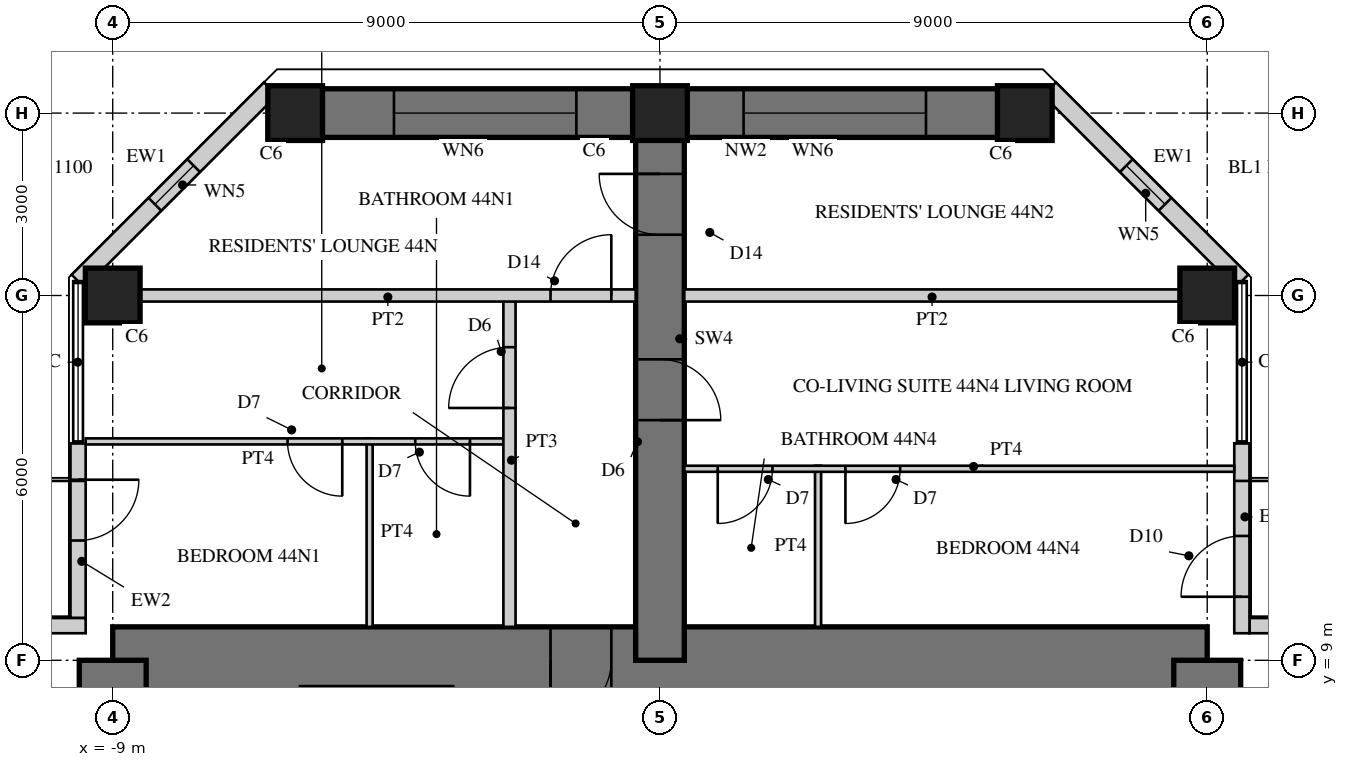
"""IFC4 building model, lengths in metres.
Left out: names, types, materials, properties, quantities, classifications, styles, units other than length and angle.
Written with IfcOpenShell. Run it as: python <this file> out.ifc"""

import sys

from ifc_helpers import new_model, si_unit, direction, frame, frame_2d, origin, origin_2d, place, context, subcontext, project, spatial, rectangle, hollow_rectangle, extrude, element, fill, save


model = new_model("IFC4")
c1 = context("Model", 3, precision=1e-05, world=origin(), true_north=direction((0.0, 1.0)))
c2 = subcontext(c1, "Body", "Model", "MODEL_VIEW")
j1 = project(units=[si_unit("LENGTHUNIT", "METRE"), si_unit("PLANEANGLEUNIT", "RADIAN")], contexts=[c1])
p1 = place(None, origin())
s1 = spatial("IfcSite", under=j1, at=p1, CompositionType="ELEMENT")
p2 = place(p1, origin())
s2 = spatial("IfcBuilding", under=s1, at=p2, CompositionType="ELEMENT")
p3 = place(p2, frame((0.0, 0.0, 179.7)))
s3 = spatial("IfcBuildingStorey", under=s2, at=p3, CompositionType="ELEMENT", Elevation=179.7)
p4 = place(p3, frame((9.0, 9.0, 0.0), z_axis=(0.0, 0.0, 1.0), x_axis=(-1.0, 0.0, 0.0)))
e1 = element("IfcWall", 1, at=p4, inside=s3, PredefinedType="SHEAR", context=c2, shape_type="SweptSolid", body=[
    extrude(rectangle(XDim=18.0, YDim=1.1, at=frame_2d((9.0, 0.0))), origin(), (0.0, 0.0, 1.0), 3.4),
])
p5 = place(p4, frame((9.8, 0.0, 0.0)))
e2 = element("IfcOpeningElement", 2, at=p5, cuts=e1, PredefinedType="OPENING", context=c2, shape_type="SweptSolid", body=[
    extrude(rectangle(XDim=1.0, YDim=2.4, at=frame_2d((0.5, 1.2))), frame((0.0, 0.56, 0.0), z_axis=(0.0, -1.0, 0.0), x_axis=(1.0, 0.0, 0.0)), (0.0, 0.0, 1.0), 1.12),
])
p6 = place(p3, frame((9.0, -9.0, 0.0), z_axis=(0.0, 0.0, 1.0), x_axis=(0.0, 1.0, 0.0)))
e3 = element("IfcWall", 3, at=p6, inside=s3, PredefinedType="SHEAR", context=c2, shape_type="SweptSolid", body=[
    extrude(rectangle(XDim=18.0, YDim=1.1, at=frame_2d((9.0, 0.0))), origin(), (0.0, 0.0, 1.0), 3.4),
])
p7 = place(p6, frame((9.8, 0.0, 0.0)))
e4 = element("IfcOpeningElement", 4, at=p7, cuts=e3, PredefinedType="OPENING", context=c2, shape_type="SweptSolid", body=[
    extrude(rectangle(XDim=1.0, YDim=2.4, at=frame_2d((0.5, 1.2))), frame((0.0, 0.56, 0.0), z_axis=(0.0, -1.0, 0.0), x_axis=(1.0, 0.0, 0.0)), (0.0, 0.0, 1.0), 1.12),
])
p8 = place(p3, frame((-9.0, 9.0, 0.0), z_axis=(0.0, 0.0, 1.0), x_axis=(0.0, -1.0, 0.0)))
e5 = element("IfcWall", 5, at=p8, inside=s3, PredefinedType="SHEAR", context=c2, shape_type="SweptSolid", body=[
    extrude(rectangle(XDim=18.0, YDim=1.1, at=frame_2d((9.0, 0.0))), origin(), (0.0, 0.0, 1.0), 3.4),
])
p9 = place(p8, frame((9.8, 0.0, 0.0)))
e6 = element("IfcOpeningElement", 6, at=p9, cuts=e5, PredefinedType="OPENING", context=c2, shape_type="SweptSolid", body=[
    extrude(rectangle(XDim=1.0, YDim=2.4, at=frame_2d((0.5, 1.2))), frame((0.0, 0.56, 0.0), z_axis=(0.0, -1.0, 0.0), x_axis=(1.0, 0.0, 0.0)), (0.0, 0.0, 1.0), 1.12),
])
p10 = place(p3, frame((0.0, 9.0, 0.0), z_axis=(0.0, 0.0, 1.0), x_axis=(0.0, 1.0, 0.0)))
e7 = element("IfcWall", 7, at=p10, inside=s3, PredefinedType="SHEAR", context=c2, shape_type="SweptSolid", body=[
    extrude(rectangle(XDim=9.0, YDim=0.8, at=frame_2d((4.5, 0.0))), origin(), (0.0, 0.0, 1.0), 3.4),
])
p11 = place(p10, frame((3.95, 0.0, 0.0)))
e8 = element("IfcOpeningElement", 8, at=p11, cuts=e7, PredefinedType="OPENING", context=c2, shape_type="SweptSolid", body=[
    extrude(rectangle(XDim=1.0, YDim=2.15, at=frame_2d((0.5, 1.075))), frame((0.0, 0.41, 0.0), z_axis=(0.0, -1.0, 0.0), x_axis=(1.0, 0.0, 0.0)), (0.0, 0.0, 1.0), 0.82),
])
p12 = place(p10, frame((7.0, 0.0, 0.0)))
e9 = element("IfcOpeningElement", 9, at=p12, cuts=e7, PredefinedType="OPENING", context=c2, shape_type="SweptSolid", body=[
    extrude(rectangle(XDim=1.0, YDim=2.2, at=frame_2d((0.5, 1.1))), frame((0.0, 0.41, 0.0), z_axis=(0.0, -1.0, 0.0), x_axis=(1.0, 0.0, 0.0)), (0.0, 0.0, 1.0), 0.82),
])
p13 = place(p3, frame((6.0, 18.0, 0.0), z_axis=(0.0, 0.0, 1.0), x_axis=(-1.0, 0.0, 0.0)))
e10 = element("IfcWall", 10, at=p13, inside=s3, PredefinedType="SHEAR", context=c2, shape_type="SweptSolid", body=[
    extrude(rectangle(XDim=12.0, YDim=0.8, at=frame_2d((6.0, 0.0))), origin(), (0.0, 0.0, 1.0), 3.4),
])
p14 = place(p13, frame((1.625, 0.0, 0.6)))
e11 = element("IfcOpeningElement", 11, at=p14, cuts=e10, PredefinedType="OPENING", context=c2, shape_type="SweptSolid", body=[
    extrude(rectangle(XDim=3.0, YDim=2.4, at=frame_2d((1.5, 1.2))), frame((0.0, 0.41, 0.0), z_axis=(0.0, -1.0, 0.0), x_axis=(1.0, 0.0, 0.0)), (0.0, 0.0, 1.0), 0.82),
])
p15 = place(p13, frame((7.375, 0.0, 0.6)))
e12 = element("IfcOpeningElement", 12, at=p15, cuts=e10, PredefinedType="OPENING", context=c2, shape_type="SweptSolid", body=[
    extrude(rectangle(XDim=3.0, YDim=2.4, at=frame_2d((1.5, 1.2))), frame((0.0, 0.41, 0.0), z_axis=(0.0, -1.0, 0.0), x_axis=(1.0, 0.0, 0.0)), (0.0, 0.0, 1.0), 0.82),
])
for number, where, z_axis, x_axis in (
    (13, (9.0, 15.0, 0.0), (0.0, 0.0, 1.0), (1.0, 0.0, 0.0)),
    (14, (-9.0, 15.0, 0.0), (0.0, 0.0, 1.0), (1.0, 0.0, 0.0)),
    (15, (6.0, 18.0, 0.0), (0.0, 0.0, 1.0), (1.0, 0.0, 0.0)),
    (16, (0.0, 18.0, 0.0), (0.0, 0.0, 1.0), (1.0, 0.0, 0.0)),
    (17, (-6.0, 18.0, 0.0), (0.0, 0.0, 1.0), (1.0, 0.0, 0.0)),
):
    element("IfcColumn", number, at=place(p3, frame(where, z_axis=z_axis, x_axis=x_axis)), inside=s3, PredefinedType="COLUMN", context=c2, shape_type="SweptSolid", body=[
        extrude(rectangle(XDim=0.9, YDim=0.9, at=origin_2d()), origin(), (0.0, 0.0, 1.0), 3.4),
    ])
p16 = place(p3, frame((12.57, 9.57, 0.0), z_axis=(0.0, 0.0, 1.0), x_axis=(-1.0, 0.0, 0.0)))
e18 = element("IfcWall", 18, at=p16, inside=s3, PredefinedType="SOLIDWALL", context=c2, shape_type="SweptSolid", body=[
    extrude(rectangle(XDim=2.875, YDim=0.25, at=frame_2d((1.438, 0.0))), origin(), (0.0, 0.0, 1.0), 3.22),
])
p17 = place(p16, frame((0.6, 0.0, 0.0)))
e19 = element("IfcOpeningElement", 19, at=p17, cuts=e18, PredefinedType="OPENING", context=c2, shape_type="SweptSolid", body=[
    extrude(rectangle(XDim=1.0, YDim=2.2, at=frame_2d((0.5, 1.1))), frame((0.0, 0.135, 0.0), z_axis=(0.0, -1.0, 0.0), x_axis=(1.0, 0.0, 0.0)), (0.0, 0.0, 1.0), 0.27),
])
p18 = place(p3, frame((9.57, 9.445, 0.0), z_axis=(0.0, 0.0, 1.0), x_axis=(0.0, 1.0, 0.0)))
e20 = element("IfcWall", 20, at=p18, inside=s3, PredefinedType="SOLIDWALL", context=c2, shape_type="SweptSolid", body=[
    extrude(rectangle(XDim=3.125, YDim=0.25, at=frame_2d((1.562, 0.0))), origin(), (0.0, 0.0, 1.0), 3.22),
])
p19 = place(p18, frame((0.6, 0.0, 0.0)))
e21 = element("IfcOpeningElement", 21, at=p19, cuts=e20, PredefinedType="OPENING", context=c2, shape_type="SweptSolid", body=[
    extrude(rectangle(XDim=1.0, YDim=2.2, at=frame_2d((0.5, 1.1))), frame((0.0, 0.135, 0.0), z_axis=(0.0, -1.0, 0.0), x_axis=(1.0, 0.0, 0.0)), (0.0, 0.0, 1.0), 0.27),
])
p20 = place(p3, frame((9.57, 15.236, 0.0), z_axis=(0.0, 0.0, 1.0), x_axis=(-0.707134062067, 0.707079499254, 0.0)))
e22 = element("IfcWall", 22, at=p20, inside=s3, PredefinedType="SOLIDWALL", context=c2, shape_type="SweptSolid", body=[
    extrude(rectangle(XDim=4.475, YDim=0.3, at=frame_2d((2.237, 0.0))), origin(), (0.0, 0.0, 1.0), 3.22),
])
p21 = place(p20, frame((1.787, 0.0, 0.3)))
e23 = element("IfcOpeningElement", 23, at=p21, cuts=e22, PredefinedType="OPENING", context=c2, shape_type="SweptSolid", body=[
    extrude(rectangle(XDim=0.9, YDim=2.4, at=frame_2d((0.45, 1.2))), frame((0.0, 0.16, 0.0), z_axis=(0.0, -1.0, 0.0), x_axis=(1.0, 0.0, 0.0)), (0.0, 0.0, 1.0), 0.32),
])
p22 = place(p3, frame((-6.406, 18.4, 0.0), z_axis=(0.0, 0.0, 1.0), x_axis=(-0.707134062067, -0.707079499254, 0.0)))
e24 = element("IfcWall", 24, at=p22, inside=s3, PredefinedType="SOLIDWALL", context=c2, shape_type="SweptSolid", body=[
    extrude(rectangle(XDim=4.475, YDim=0.3, at=frame_2d((2.237, 0.0))), origin(), (0.0, 0.0, 1.0), 3.22),
])
p23 = place(p22, frame((1.787, 0.0, 0.3)))
e25 = element("IfcOpeningElement", 25, at=p23, cuts=e24, PredefinedType="OPENING", context=c2, shape_type="SweptSolid", body=[
    extrude(rectangle(XDim=0.9, YDim=2.4, at=frame_2d((0.45, 1.2))), frame((0.0, 0.16, 0.0), z_axis=(0.0, -1.0, 0.0), x_axis=(1.0, 0.0, 0.0)), (0.0, 0.0, 1.0), 0.32),
])
p24 = place(p3, frame((-9.57, 12.57, 0.0), z_axis=(0.0, 0.0, 1.0), x_axis=(0.0, -1.0, 0.0)))
e26 = element("IfcWall", 26, at=p24, inside=s3, PredefinedType="SOLIDWALL", context=c2, shape_type="SweptSolid", body=[
    extrude(rectangle(XDim=2.875, YDim=0.25, at=frame_2d((1.438, 0.0))), origin(), (0.0, 0.0, 1.0), 3.22),
])
p25 = place(p24, frame((0.6, 0.0, 0.0)))
e27 = element("IfcOpeningElement", 27, at=p25, cuts=e26, PredefinedType="OPENING", context=c2, shape_type="SweptSolid", body=[
    extrude(rectangle(XDim=1.0, YDim=2.2, at=frame_2d((0.5, 1.1))), frame((0.0, 0.135, 0.0), z_axis=(0.0, -1.0, 0.0), x_axis=(1.0, 0.0, 0.0)), (0.0, 0.0, 1.0), 0.27),
])
p26 = place(p3, frame((-9.445, 9.57, 0.0), z_axis=(0.0, 0.0, 1.0), x_axis=(-1.0, 0.0, 0.0)))
e28 = element("IfcWall", 28, at=p26, inside=s3, PredefinedType="SOLIDWALL", context=c2, shape_type="SweptSolid", body=[
    extrude(rectangle(XDim=3.125, YDim=0.25, at=frame_2d((1.562, 0.0))), origin(), (0.0, 0.0, 1.0), 3.22),
])
p27 = place(p26, frame((0.6, 0.0, 0.0)))
e29 = element("IfcOpeningElement", 29, at=p27, cuts=e28, PredefinedType="OPENING", context=c2, shape_type="SweptSolid", body=[
    extrude(rectangle(XDim=1.0, YDim=2.2, at=frame_2d((0.5, 1.1))), frame((0.0, 0.135, 0.0), z_axis=(0.0, -1.0, 0.0), x_axis=(1.0, 0.0, 0.0)), (0.0, 0.0, 1.0), 0.27),
])
p28 = place(p3, frame((-4.775, 9.55, 0.0), z_axis=(0.0, 0.0, 1.0), x_axis=(0.0, 1.0, 0.0)))
e30 = element("IfcWall", 30, at=p28, inside=s3, PredefinedType="PARTITIONING", context=c2, shape_type="SweptSolid", body=[
    extrude(rectangle(XDim=3.1, YDim=0.1, at=frame_2d((1.55, 0.0))), origin(), (0.0, 0.0, 1.0), 3.22),
])
p29 = place(p3, frame((-2.575, 12.6, 0.0), z_axis=(0.0, 0.0, 1.0), x_axis=(-1.0, 0.0, 0.0)))
e31 = element("IfcWall", 31, at=p29, inside=s3, PredefinedType="PARTITIONING", context=c2, shape_type="SweptSolid", body=[
    extrude(rectangle(XDim=6.87, YDim=0.1, at=frame_2d((3.435, 0.0))), origin(), (0.0, 0.0, 1.0), 3.22),
])
p30 = place(p29, frame((0.55, 0.0, 0.0)))
e32 = element("IfcOpeningElement", 32, at=p30, cuts=e31, PredefinedType="OPENING", context=c2, shape_type="SweptSolid", body=[
    extrude(rectangle(XDim=0.9, YDim=2.1, at=frame_2d((0.45, 1.05))), frame((0.0, 0.06, 0.0), z_axis=(0.0, -1.0, 0.0), x_axis=(1.0, 0.0, 0.0)), (0.0, 0.0, 1.0), 0.12),
])
p31 = place(p29, frame((2.65, 0.0, 0.0)))
e33 = element("IfcOpeningElement", 33, at=p31, cuts=e31, PredefinedType="OPENING", context=c2, shape_type="SweptSolid", body=[
    extrude(rectangle(XDim=0.9, YDim=2.1, at=frame_2d((0.45, 1.05))), frame((0.0, 0.06, 0.0), z_axis=(0.0, -1.0, 0.0), x_axis=(1.0, 0.0, 0.0)), (0.0, 0.0, 1.0), 0.12),
])
p32 = place(p3, frame((2.6, 9.55, 0.0), z_axis=(0.0, 0.0, 1.0), x_axis=(0.0, 1.0, 0.0)))
e34 = element("IfcWall", 34, at=p32, inside=s3, PredefinedType="PARTITIONING", context=c2, shape_type="SweptSolid", body=[
    extrude(rectangle(XDim=2.65, YDim=0.1, at=frame_2d((1.325, 0.0))), origin(), (0.0, 0.0, 1.0), 3.22),
])
p33 = place(p3, frame((9.445, 12.15, 0.0), z_axis=(0.0, 0.0, 1.0), x_axis=(-1.0, 0.0, 0.0)))
e35 = element("IfcWall", 35, at=p33, inside=s3, PredefinedType="PARTITIONING", context=c2, shape_type="SweptSolid", body=[
    extrude(rectangle(XDim=9.045, YDim=0.1, at=frame_2d((4.522, 0.0))), origin(), (0.0, 0.0, 1.0), 3.22),
])
p34 = place(p33, frame((5.495, 0.0, 0.0)))
e36 = element("IfcOpeningElement", 36, at=p34, cuts=e35, PredefinedType="OPENING", context=c2, shape_type="SweptSolid", body=[
    extrude(rectangle(XDim=0.9, YDim=2.1, at=frame_2d((0.45, 1.05))), frame((0.0, 0.06, 0.0), z_axis=(0.0, -1.0, 0.0), x_axis=(1.0, 0.0, 0.0)), (0.0, 0.0, 1.0), 0.12),
])
p35 = place(p33, frame((7.595, 0.0, 0.0)))
e37 = element("IfcOpeningElement", 37, at=p35, cuts=e35, PredefinedType="OPENING", context=c2, shape_type="SweptSolid", body=[
    extrude(rectangle(XDim=0.9, YDim=2.1, at=frame_2d((0.45, 1.05))), frame((0.0, 0.06, 0.0), z_axis=(0.0, -1.0, 0.0), x_axis=(1.0, 0.0, 0.0)), (0.0, 0.0, 1.0), 0.12),
])
p36 = place(p3, frame((-2.475, 9.55, 0.0), z_axis=(0.0, 0.0, 1.0), x_axis=(0.0, 1.0, 0.0)))
e38 = element("IfcWall", 38, at=p36, inside=s3, PredefinedType="SOLIDWALL", context=c2, shape_type="SweptSolid", body=[
    extrude(rectangle(XDim=5.45, YDim=0.2, at=frame_2d((2.725, 0.0))), origin(), (0.0, 0.0, 1.0), 3.22),
])
p37 = place(p36, frame((3.6, 0.0, 0.0)))
e39 = element("IfcOpeningElement", 39, at=p37, cuts=e38, PredefinedType="OPENING", context=c2, shape_type="SweptSolid", body=[
    extrude(rectangle(XDim=1.0, YDim=2.15, at=frame_2d((0.5, 1.075))), frame((0.0, 0.11, 0.0), z_axis=(0.0, -1.0, 0.0), x_axis=(1.0, 0.0, 0.0)), (0.0, 0.0, 1.0), 0.22),
])
p38 = place(p3, frame((8.55, 15.0, 0.0), z_axis=(0.0, 0.0, 1.0), x_axis=(-1.0, 0.0, 0.0)))
e40 = element("IfcWall", 40, at=p38, inside=s3, PredefinedType="SOLIDWALL", context=c2, shape_type="SweptSolid", body=[
    extrude(rectangle(XDim=8.15, YDim=0.2, at=frame_2d((4.075, 0.0))), origin(), (0.0, 0.0, 1.0), 2.47),
])
p39 = place(p3, frame((-0.4, 15.0, 0.0), z_axis=(0.0, 0.0, 1.0), x_axis=(-1.0, 0.0, 0.0)))
e41 = element("IfcWall", 41, at=p39, inside=s3, PredefinedType="SOLIDWALL", context=c2, shape_type="SweptSolid", body=[
    extrude(rectangle(XDim=8.15, YDim=0.2, at=frame_2d((4.075, 0.0))), origin(), (0.0, 0.0, 1.0), 2.47),
])
p40 = place(p39, frame((0.4, 0.0, 0.0)))
e42 = element("IfcOpeningElement", 42, at=p40, cuts=e41, PredefinedType="OPENING", context=c2, shape_type="SweptSolid", body=[
    extrude(rectangle(XDim=1.0, YDim=2.2, at=frame_2d((0.5, 1.1))), frame((0.0, 0.11, 0.0), z_axis=(0.0, -1.0, 0.0), x_axis=(1.0, 0.0, 0.0)), (0.0, 0.0, 1.0), 0.22),
])
p41 = place(p19, origin())
e43 = element("IfcDoor", 43, at=p41, inside=s3, OperationType="SINGLE_SWING_LEFT", PredefinedType="DOOR", context=c2, shape_type="SweptSolid", body=[
    extrude(hollow_rectangle(XDim=1.0, YDim=2.2, WallThickness=0.06, at=frame_2d((0.5, 1.1))), frame((0.0, 0.025, 0.0), z_axis=(0.0, -1.0, 0.0), x_axis=(1.0, 0.0, 0.0)), (0.0, 0.0, 1.0), 0.05),
    extrude(rectangle(XDim=0.879, YDim=2.079, at=frame_2d((0.5, 1.1))), frame((0.0, 0.025, 0.0), z_axis=(0.0, -1.0, 0.0), x_axis=(1.0, 0.0, 0.0)), (0.0, 0.0, 1.0), 0.05),
])
fill(e21, e43)
p42 = place(p21, origin())
e44 = element("IfcWindow", 44, at=p42, inside=s3, PartitioningType="SINGLE_PANEL", PredefinedType="WINDOW", context=c2, shape_type="SweptSolid", body=[
    extrude(hollow_rectangle(XDim=0.9, YDim=2.4, WallThickness=0.06, at=frame_2d((0.45, 1.2))), frame((0.0, 0.03, 0.0), z_axis=(0.0, -1.0, 0.0), x_axis=(1.0, 0.0, 0.0)), (0.0, 0.0, 1.0), 0.06),
    extrude(rectangle(XDim=0.779, YDim=2.279, at=frame_2d((0.45, 1.2))), frame((0.0, 0.03, 0.0), z_axis=(0.0, -1.0, 0.0), x_axis=(1.0, 0.0, 0.0)), (0.0, 0.0, 1.0), 0.06),
])
fill(e23, e44)
p43 = place(p14, origin())
e45 = element("IfcWindow", 45, at=p43, inside=s3, PartitioningType="SINGLE_PANEL", PredefinedType="WINDOW", context=c2, shape_type="SweptSolid", body=[
    extrude(hollow_rectangle(XDim=3.0, YDim=2.4, WallThickness=0.06, at=frame_2d((1.5, 1.2))), frame((0.0, 0.03, 0.0), z_axis=(0.0, -1.0, 0.0), x_axis=(1.0, 0.0, 0.0)), (0.0, 0.0, 1.0), 0.06),
    extrude(rectangle(XDim=2.879, YDim=2.279, at=frame_2d((1.5, 1.2))), frame((0.0, 0.03, 0.0), z_axis=(0.0, -1.0, 0.0), x_axis=(1.0, 0.0, 0.0)), (0.0, 0.0, 1.0), 0.06),
])
fill(e11, e45)
p44 = place(p15, origin())
e46 = element("IfcWindow", 46, at=p44, inside=s3, PartitioningType="SINGLE_PANEL", PredefinedType="WINDOW", context=c2, shape_type="SweptSolid", body=[
    extrude(hollow_rectangle(XDim=3.0, YDim=2.4, WallThickness=0.06, at=frame_2d((1.5, 1.2))), frame((0.0, 0.03, 0.0), z_axis=(0.0, -1.0, 0.0), x_axis=(1.0, 0.0, 0.0)), (0.0, 0.0, 1.0), 0.06),
    extrude(rectangle(XDim=2.879, YDim=2.279, at=frame_2d((1.5, 1.2))), frame((0.0, 0.03, 0.0), z_axis=(0.0, -1.0, 0.0), x_axis=(1.0, 0.0, 0.0)), (0.0, 0.0, 1.0), 0.06),
])
fill(e12, e46)
p45 = place(p23, origin())
e47 = element("IfcWindow", 47, at=p45, inside=s3, PartitioningType="SINGLE_PANEL", PredefinedType="WINDOW", context=c2, shape_type="SweptSolid", body=[
    extrude(hollow_rectangle(XDim=0.9, YDim=2.4, WallThickness=0.06, at=frame_2d((0.45, 1.2))), frame((0.0, 0.03, 0.0), z_axis=(0.0, -1.0, 0.0), x_axis=(1.0, 0.0, 0.0)), (0.0, 0.0, 1.0), 0.06),
    extrude(rectangle(XDim=0.779, YDim=2.279, at=frame_2d((0.45, 1.2))), frame((0.0, 0.03, 0.0), z_axis=(0.0, -1.0, 0.0), x_axis=(1.0, 0.0, 0.0)), (0.0, 0.0, 1.0), 0.06),
])
fill(e25, e47)
p46 = place(p25, origin())
e48 = element("IfcDoor", 48, at=p46, inside=s3, OperationType="SINGLE_SWING_LEFT", PredefinedType="DOOR", context=c2, shape_type="SweptSolid", body=[
    extrude(hollow_rectangle(XDim=1.0, YDim=2.2, WallThickness=0.06, at=frame_2d((0.5, 1.1))), frame((0.0, 0.025, 0.0), z_axis=(0.0, -1.0, 0.0), x_axis=(1.0, 0.0, 0.0)), (0.0, 0.0, 1.0), 0.05),
    extrude(rectangle(XDim=0.879, YDim=2.079, at=frame_2d((0.5, 1.1))), frame((0.0, 0.025, 0.0), z_axis=(0.0, -1.0, 0.0), x_axis=(1.0, 0.0, 0.0)), (0.0, 0.0, 1.0), 0.05),
])
fill(e27, e48)
p47 = place(p30, origin())
e49 = element("IfcDoor", 49, at=p47, inside=s3, OperationType="SINGLE_SWING_LEFT", PredefinedType="DOOR", context=c2, shape_type="SweptSolid", body=[
    extrude(rectangle(XDim=0.9, YDim=2.1, at=frame_2d((0.45, 1.05))), frame((0.0, 0.025, 0.0), z_axis=(0.0, -1.0, 0.0), x_axis=(1.0, 0.0, 0.0)), (0.0, 0.0, 1.0), 0.05),
])
fill(e32, e49)
p48 = place(p31, origin())
e50 = element("IfcDoor", 50, at=p48, inside=s3, OperationType="SINGLE_SWING_LEFT", PredefinedType="DOOR", context=c2, shape_type="SweptSolid", body=[
    extrude(rectangle(XDim=0.9, YDim=2.1, at=frame_2d((0.45, 1.05))), frame((0.0, 0.025, 0.0), z_axis=(0.0, -1.0, 0.0), x_axis=(1.0, 0.0, 0.0)), (0.0, 0.0, 1.0), 0.05),
])
fill(e33, e50)
p49 = place(p34, origin())
e51 = element("IfcDoor", 51, at=p49, inside=s3, OperationType="SINGLE_SWING_RIGHT", PredefinedType="DOOR", context=c2, shape_type="SweptSolid", body=[
    extrude(rectangle(XDim=0.9, YDim=2.1, at=frame_2d((0.45, 1.05))), frame((0.0, 0.025, 0.0), z_axis=(0.0, -1.0, 0.0), x_axis=(1.0, 0.0, 0.0)), (0.0, 0.0, 1.0), 0.05),
])
fill(e36, e51)
p50 = place(p35, origin())
e52 = element("IfcDoor", 52, at=p50, inside=s3, OperationType="SINGLE_SWING_RIGHT", PredefinedType="DOOR", context=c2, shape_type="SweptSolid", body=[
    extrude(rectangle(XDim=0.9, YDim=2.1, at=frame_2d((0.45, 1.05))), frame((0.0, 0.025, 0.0), z_axis=(0.0, -1.0, 0.0), x_axis=(1.0, 0.0, 0.0)), (0.0, 0.0, 1.0), 0.05),
])
fill(e37, e52)
p51 = place(p37, origin())
e53 = element("IfcDoor", 53, at=p51, inside=s3, OperationType="SINGLE_SWING_LEFT", PredefinedType="DOOR", context=c2, shape_type="SweptSolid", body=[
    extrude(rectangle(XDim=1.0, YDim=2.15, at=frame_2d((0.5, 1.075))), frame((0.0, 0.025, 0.0), z_axis=(0.0, -1.0, 0.0), x_axis=(1.0, 0.0, 0.0)), (0.0, 0.0, 1.0), 0.05),
])
fill(e39, e53)
p52 = place(p40, frame((1.0, 0.0, 0.0), z_axis=(0.0, 0.0, 1.0), x_axis=(-1.0, 0.0, 0.0)))
e54 = element("IfcDoor", 54, at=p52, inside=s3, OperationType="SINGLE_SWING_RIGHT", PredefinedType="DOOR", context=c2, shape_type="SweptSolid", body=[
    extrude(rectangle(XDim=1.0, YDim=2.2, at=frame_2d((0.5, 1.1))), frame((0.0, 0.025, 0.0), z_axis=(0.0, -1.0, 0.0), x_axis=(1.0, 0.0, 0.0)), (0.0, 0.0, 1.0), 0.05),
])
fill(e42, e54)
p53 = place(p11, frame((1.0, 0.0, 0.0), z_axis=(0.0, 0.0, 1.0), x_axis=(-1.0, 0.0, 0.0)))
e55 = element("IfcDoor", 55, at=p53, inside=s3, OperationType="SINGLE_SWING_RIGHT", PredefinedType="DOOR", context=c2, shape_type="SweptSolid", body=[
    extrude(rectangle(XDim=1.0, YDim=2.15, at=frame_2d((0.5, 1.075))), frame((0.0, 0.025, 0.0), z_axis=(0.0, -1.0, 0.0), x_axis=(1.0, 0.0, 0.0)), (0.0, 0.0, 1.0), 0.05),
])
fill(e8, e55)
p54 = place(p12, origin())
e56 = element("IfcDoor", 56, at=p54, inside=s3, OperationType="SINGLE_SWING_RIGHT", PredefinedType="DOOR", context=c2, shape_type="SweptSolid", body=[
    extrude(rectangle(XDim=1.0, YDim=2.2, at=frame_2d((0.5, 1.1))), frame((0.0, 0.025, 0.0), z_axis=(0.0, -1.0, 0.0), x_axis=(1.0, 0.0, 0.0)), (0.0, 0.0, 1.0), 0.05),
])
fill(e9, e56)
p55 = place(p5, origin())
e57 = element("IfcDoor", 57, at=p55, inside=s3, OperationType="SINGLE_SWING_RIGHT", PredefinedType="DOOR", context=c2, shape_type="SweptSolid", body=[
    extrude(rectangle(XDim=1.0, YDim=2.4, at=frame_2d((0.5, 1.2))), frame((0.0, 0.055, 0.0), z_axis=(0.0, -1.0, 0.0), x_axis=(1.0, 0.0, 0.0)), (0.0, 0.0, 1.0), 0.05),
])
fill(e2, e57)
save(model, sys.argv[1])
